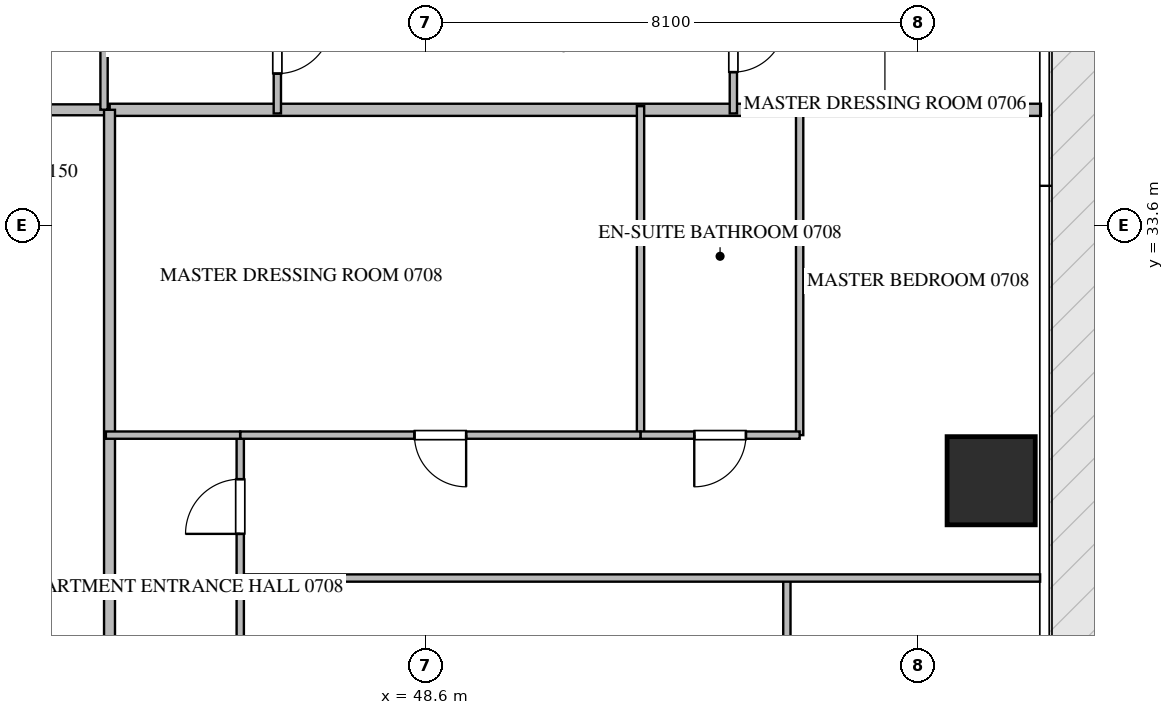
"""IFC4 building model, lengths in metres.
Left out: names, types, materials, properties, quantities, classifications, styles, units other than length and angle.
Written with IfcOpenShell. Run it as: python <this file> out.ifc"""

import sys

from ifc_helpers import new_model, si_unit, direction, frame, frame_2d, origin, origin_2d, place, context, subcontext, project, spatial, rectangle, extrude, source, transform, mapped, element, fill, save


model = new_model("IFC4")
c1 = context("Model", 3, precision=1e-05, world=origin(), true_north=direction((0.0, 1.0)))
c2 = subcontext(c1, "Body", "Model", "MODEL_VIEW")
j1 = project(units=[si_unit("LENGTHUNIT", "METRE"), si_unit("PLANEANGLEUNIT", "RADIAN")], contexts=[c1])
p1 = place(None, origin())
s1 = spatial("IfcSite", under=j1, at=p1, CompositionType="ELEMENT")
p2 = place(p1, origin())
s2 = spatial("IfcBuilding", under=s1, at=p2, CompositionType="ELEMENT")
p3 = place(p2, frame((0.0, 0.0, 34.2)))
s3 = spatial("IfcBuildingStorey", under=s2, at=p3, CompositionType="ELEMENT", Elevation=34.2)
m1 = source(origin(), c2, "Body", "SweptSolid", [
    extrude(rectangle(XDim=1.45, YDim=1.45, at=origin_2d()), origin(), (0.0, 0.0, 1.0), 3.75),
])
p4 = place(p3, frame((57.9, 29.4, -0.26), z_axis=(0.0, 0.0, 1.0), x_axis=(1.0, 0.0, 0.0)))
e1 = element("IfcColumn", 1, at=p4, inside=s3, PredefinedType="COLUMN", context=c2, shape_type="MappedRepresentation", body=[
    mapped(m1, transform((0.0, 0.0, 0.0), scale=1.0)),
])
p5 = place(p3, frame((43.4, 35.5, 0.0), z_axis=(0.0, 0.0, 1.0), x_axis=(1.0, 0.0, 0.0)))
e2 = element("IfcWall", 2, at=p5, inside=s3, PredefinedType="PARTITIONING", context=c2, shape_type="SweptSolid", body=[
    extrude(rectangle(XDim=15.318, YDim=0.2, at=frame_2d((7.659, 0.0))), origin(), (0.0, 0.0, 1.0), 3.49),
])
p6 = place(p3, frame((21.402, 35.5, 0.0), z_axis=(0.0, 0.0, 1.0), x_axis=(1.0, 0.0, 0.0)))
e3 = element("IfcWall", 3, at=p6, inside=s3, PredefinedType="PARTITIONING", context=c2, shape_type="SweptSolid", body=[
    extrude(rectangle(XDim=21.996, YDim=0.18, at=frame_2d((10.998, 0.0))), origin(), (0.0, 0.0, 1.0), 3.49),
])
p7 = place(p6, frame((2.1, 0.0, 0.0)))
e4 = element("IfcOpeningElement", 4, at=p7, cuts=e3, PredefinedType="OPENING", context=c2, shape_type="SweptSolid", body=[
    extrude(rectangle(XDim=1.0, YDim=2.15, at=frame_2d((0.5, 1.075))), frame((0.0, 0.1, 0.0), z_axis=(0.0, -1.0, 0.0), x_axis=(1.0, 0.0, 0.0)), (0.0, 0.0, 1.0), 0.2),
])
p8 = place(p6, frame((14.277, 0.0, 0.0)))
e5 = element("IfcOpeningElement", 5, at=p8, cuts=e3, PredefinedType="OPENING", context=c2, shape_type="SweptSolid", body=[
    extrude(rectangle(XDim=1.0, YDim=2.15, at=frame_2d((0.5, 1.075))), frame((0.0, 0.1, 0.0), z_axis=(0.0, -1.0, 0.0), x_axis=(1.0, 0.0, 0.0)), (0.0, 0.0, 1.0), 0.2),
])
p9 = place(p6, frame((18.896, 0.0, 0.0)))
e6 = element("IfcOpeningElement", 6, at=p9, cuts=e3, PredefinedType="OPENING", context=c2, shape_type="SweptSolid", body=[
    extrude(rectangle(XDim=1.0, YDim=2.15, at=frame_2d((0.5, 1.075))), frame((0.0, 0.1, 0.0), z_axis=(0.0, -1.0, 0.0), x_axis=(1.0, 0.0, 0.0)), (0.0, 0.0, 1.0), 0.2),
])
p10 = place(p3, frame((43.4, 14.9, 0.0), z_axis=(0.0, 0.0, 1.0), x_axis=(0.0, 1.0, 0.0)))
e7 = element("IfcWall", 7, at=p10, inside=s3, PredefinedType="PARTITIONING", context=c2, shape_type="SweptSolid", body=[
    extrude(rectangle(XDim=20.6, YDim=0.18, at=frame_2d((10.3, 0.0))), origin(), (0.0, 0.0, 1.0), 3.49),
])
p11 = place(p10, frame((1.96, 0.0, 0.0)))
e8 = element("IfcOpeningElement", 8, at=p11, cuts=e7, PredefinedType="OPENING", context=c2, shape_type="SweptSolid", body=[
    extrude(rectangle(XDim=1.0, YDim=2.15, at=frame_2d((0.5, 1.075))), frame((0.0, 0.1, 0.0), z_axis=(0.0, -1.0, 0.0), x_axis=(1.0, 0.0, 0.0)), (0.0, 0.0, 1.0), 0.2),
])
p12 = place(p3, frame((43.31, 38.25, 0.0), z_axis=(0.0, 0.0, 1.0), x_axis=(0.0, -1.0, 0.0)))
e9 = element("IfcWall", 9, at=p12, inside=s3, PredefinedType="PARTITIONING", context=c2, shape_type="SweptSolid", body=[
    extrude(rectangle(XDim=2.748, YDim=0.12, at=frame_2d((1.374, 0.0))), origin(), (0.0, 0.0, 1.0), 3.49),
])
p13 = place(p3, frame((46.16, 37.65, 0.0), z_axis=(0.0, 0.0, 1.0), x_axis=(0.0, -1.0, 0.0)))
e10 = element("IfcWall", 10, at=p13, inside=s3, PredefinedType="PARTITIONING", context=c2, shape_type="SweptSolid", body=[
    extrude(rectangle(XDim=2.21, YDim=0.12, at=frame_2d((1.105, 0.0))), origin(), (0.0, 0.0, 1.0), 3.49),
])
p14 = place(p13, frame((0.655, 0.0, 0.0)))
e11 = element("IfcOpeningElement", 11, at=p14, cuts=e10, PredefinedType="OPENING", context=c2, shape_type="SweptSolid", body=[
    extrude(rectangle(XDim=0.9, YDim=2.1, at=frame_2d((0.45, 1.05))), frame((0.0, 0.07, 0.0), z_axis=(0.0, -1.0, 0.0), x_axis=(1.0, 0.0, 0.0)), (0.0, 0.0, 1.0), 0.14),
])
p15 = place(p3, frame((53.66, 37.65, 0.0), z_axis=(0.0, 0.0, 1.0), x_axis=(0.0, -1.0, 0.0)))
e12 = element("IfcWall", 12, at=p15, inside=s3, PredefinedType="PARTITIONING", context=c2, shape_type="SweptSolid", body=[
    extrude(rectangle(XDim=2.21, YDim=0.12, at=frame_2d((1.105, 0.0))), origin(), (0.0, 0.0, 1.0), 3.49),
])
p16 = place(p15, frame((0.68, 0.0, 0.0)))
e13 = element("IfcOpeningElement", 13, at=p16, cuts=e12, PredefinedType="OPENING", context=c2, shape_type="SweptSolid", body=[
    extrude(rectangle(XDim=0.85, YDim=2.1, at=frame_2d((0.425, 1.05))), frame((0.0, 0.07, 0.0), z_axis=(0.0, -1.0, 0.0), x_axis=(1.0, 0.0, 0.0)), (0.0, 0.0, 1.0), 0.14),
])
p17 = place(p3, frame((54.54, 22.73, 0.0), z_axis=(0.0, 0.0, 1.0), x_axis=(0.0, 1.0, 0.0)))
e14 = element("IfcWall", 14, at=p17, inside=s3, PredefinedType="PARTITIONING", context=c2, shape_type="SweptSolid", body=[
    extrude(rectangle(XDim=5.07, YDim=0.12, at=frame_2d((2.535, 0.0))), origin(), (0.0, 0.0, 1.0), 3.49),
])
p18 = place(p3, frame((58.705, 27.8, 0.0), z_axis=(0.0, 0.0, 1.0), x_axis=(-1.0, 0.0, 0.0)))
e15 = element("IfcWall", 15, at=p18, inside=s3, PredefinedType="PARTITIONING", context=c2, shape_type="SweptSolid", body=[
    extrude(rectangle(XDim=13.155, YDim=0.12, at=frame_2d((6.578, 0.0))), origin(), (0.0, 0.0, 1.0), 3.49),
])
p19 = place(p3, frame((45.55, 24.832, 0.0), z_axis=(0.0, 0.0, 1.0), x_axis=(0.0, 1.0, 0.0)))
e16 = element("IfcWall", 16, at=p19, inside=s3, PredefinedType="PARTITIONING", context=c2, shape_type="SweptSolid", body=[
    extrude(rectangle(XDim=2.968, YDim=0.12, at=frame_2d((1.484, 0.0))), origin(), (0.0, 0.0, 1.0), 3.49),
])
p20 = place(p19, frame((1.059, 0.0, 0.0)))
e17 = element("IfcOpeningElement", 17, at=p20, cuts=e16, PredefinedType="OPENING", context=c2, shape_type="SweptSolid", body=[
    extrude(rectangle(XDim=0.85, YDim=2.1, at=frame_2d((0.425, 1.05))), frame((0.0, 0.07, 0.0), z_axis=(0.0, -1.0, 0.0), x_axis=(1.0, 0.0, 0.0)), (0.0, 0.0, 1.0), 0.14),
])
p21 = place(p3, frame((45.55, 27.802, 0.0), z_axis=(0.0, 0.0, 1.0), x_axis=(0.0, 1.0, 0.0)))
e18 = element("IfcWall", 18, at=p21, inside=s3, PredefinedType="PARTITIONING", context=c2, shape_type="SweptSolid", body=[
    extrude(rectangle(XDim=2.348, YDim=0.12, at=frame_2d((1.174, 0.0))), origin(), (0.0, 0.0, 1.0), 3.49),
])
p22 = place(p21, frame((0.724, 0.0, 0.0)))
e19 = element("IfcOpeningElement", 19, at=p22, cuts=e18, PredefinedType="OPENING", context=c2, shape_type="SweptSolid", body=[
    extrude(rectangle(XDim=0.9, YDim=2.1, at=frame_2d((0.45, 1.05))), frame((0.0, 0.07, 0.0), z_axis=(0.0, -1.0, 0.0), x_axis=(1.0, 0.0, 0.0)), (0.0, 0.0, 1.0), 0.14),
])
for number, where, z_axis, x_axis in (
    (20, (54.75, 30.15, 0.0), (0.0, 0.0, 1.0), (0.0, 1.0, 0.0)),
    (21, (52.133, 30.15, 0.0), (0.0, 0.0, 1.0), (0.0, 1.0, 0.0)),
):
    element("IfcWall", number, at=place(p3, frame(where, z_axis=z_axis, x_axis=x_axis)), inside=s3, PredefinedType="PARTITIONING", context=c2, shape_type="SweptSolid", body=[
        extrude(rectangle(XDim=5.41, YDim=0.12, at=frame_2d((2.705, 0.0))), origin(), (0.0, 0.0, 1.0), 3.49),
    ])
p23 = place(p3, frame((54.75, 30.15, 0.0), z_axis=(0.0, 0.0, 1.0), x_axis=(-1.0, 0.0, 0.0)))
e22 = element("IfcWall", 22, at=p23, inside=s3, PredefinedType="PARTITIONING", context=c2, shape_type="SweptSolid", body=[
    extrude(rectangle(XDim=2.617, YDim=0.12, at=frame_2d((1.309, 0.0))), origin(), (0.0, 0.0, 1.0), 3.49),
])
p24 = place(p23, frame((0.883, 0.0, 0.0)))
e23 = element("IfcOpeningElement", 23, at=p24, cuts=e22, PredefinedType="OPENING", context=c2, shape_type="SweptSolid", body=[
    extrude(rectangle(XDim=0.85, YDim=2.1, at=frame_2d((0.425, 1.05))), frame((0.0, 0.07, 0.0), z_axis=(0.0, -1.0, 0.0), x_axis=(1.0, 0.0, 0.0)), (0.0, 0.0, 1.0), 0.14),
])
p25 = place(p3, frame((52.131, 30.15, 0.0), z_axis=(0.0, 0.0, 1.0), x_axis=(-1.0, 0.0, 0.0)))
e24 = element("IfcWall", 24, at=p25, inside=s3, PredefinedType="PARTITIONING", context=c2, shape_type="SweptSolid", body=[
    extrude(rectangle(XDim=6.581, YDim=0.12, at=frame_2d((3.291, 0.0))), origin(), (0.0, 0.0, 1.0), 3.49),
])
p26 = place(p25, frame((2.866, 0.0, 0.0)))
e25 = element("IfcOpeningElement", 25, at=p26, cuts=e24, PredefinedType="OPENING", context=c2, shape_type="SweptSolid", body=[
    extrude(rectangle(XDim=0.85, YDim=2.1, at=frame_2d((0.425, 1.05))), frame((0.0, 0.07, 0.0), z_axis=(0.0, -1.0, 0.0), x_axis=(1.0, 0.0, 0.0)), (0.0, 0.0, 1.0), 0.14),
])
p27 = place(p3, frame((45.548, 30.15, 0.0), z_axis=(0.0, 0.0, 1.0), x_axis=(-1.0, 0.0, 0.0)))
e26 = element("IfcWall", 26, at=p27, inside=s3, PredefinedType="PARTITIONING", context=c2, shape_type="SweptSolid", body=[
    extrude(rectangle(XDim=2.208, YDim=0.12, at=frame_2d((1.104, 0.0))), origin(), (0.0, 0.0, 1.0), 3.49),
])
m2 = source(origin(), c2, "Body", "SweptSolid", [
    extrude(rectangle(XDim=0.9, YDim=2.1, at=frame_2d((0.45, 1.05))), frame((0.0, 0.025, 0.0), z_axis=(0.0, -1.0, 0.0), x_axis=(1.0, 0.0, 0.0)), (0.0, 0.0, 1.0), 0.05),
])
p28 = place(p14, origin())
e27 = element("IfcDoor", 27, at=p28, inside=s3, OperationType="SINGLE_SWING_LEFT", PredefinedType="DOOR", context=c2, shape_type="MappedRepresentation", body=[
    mapped(m2, transform((0.0, 0.0, 0.0), scale=1.0)),
])
fill(e11, e27)
m3 = source(origin(), c2, "Body", "SweptSolid", [
    extrude(rectangle(XDim=0.85, YDim=2.1, at=frame_2d((0.425, 1.05))), frame((0.0, 0.025, 0.0), z_axis=(0.0, -1.0, 0.0), x_axis=(1.0, 0.0, 0.0)), (0.0, 0.0, 1.0), 0.05),
])
p29 = place(p16, origin())
e28 = element("IfcDoor", 28, at=p29, inside=s3, OperationType="SINGLE_SWING_LEFT", PredefinedType="DOOR", context=c2, shape_type="MappedRepresentation", body=[
    mapped(m3, transform((0.0, 0.0, 0.0), scale=1.0)),
])
fill(e13, e28)
p30 = place(p22, origin())
e29 = element("IfcDoor", 29, at=p30, inside=s3, OperationType="SINGLE_SWING_LEFT", PredefinedType="DOOR", context=c2, shape_type="MappedRepresentation", body=[
    mapped(m2, transform((0.0, 0.0, 0.0), scale=1.0)),
])
fill(e19, e29)
p31 = place(p24, origin())
e30 = element("IfcDoor", 30, at=p31, inside=s3, OperationType="SINGLE_SWING_RIGHT", PredefinedType="DOOR", context=c2, shape_type="MappedRepresentation", body=[
    mapped(m3, transform((0.0, 0.0, 0.0), scale=1.0)),
])
fill(e23, e30)
p32 = place(p26, origin())
e31 = element("IfcDoor", 31, at=p32, inside=s3, OperationType="SINGLE_SWING_LEFT", PredefinedType="DOOR", context=c2, shape_type="MappedRepresentation", body=[
    mapped(m3, transform((0.0, 0.0, 0.0), scale=1.0)),
])
fill(e25, e31)
save(model, sys.argv[1])
